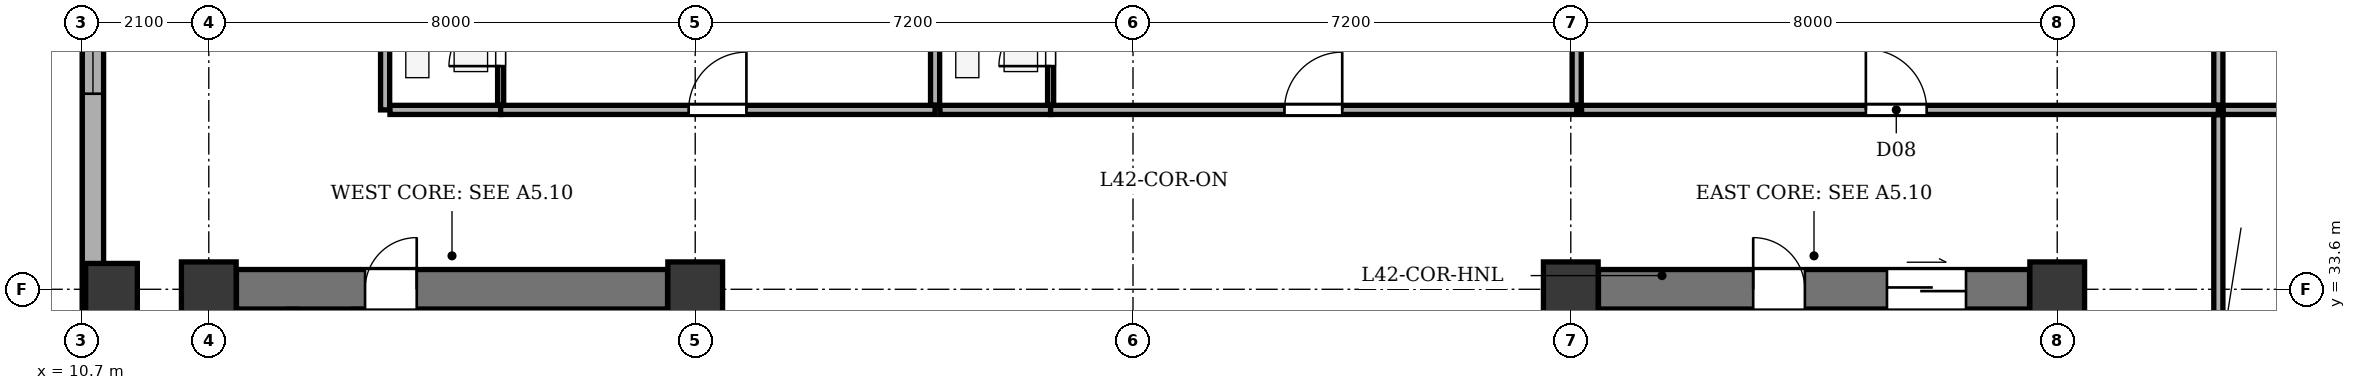
"""IFC4 building model, lengths in metres.
Left out: names, types, materials, properties, quantities, classifications, styles, units other than length and angle.
Written with IfcOpenShell. Run it as: python <this file> out.ifc"""

import sys

from ifc_helpers import new_model, si_unit, direction, frame, frame_2d, origin, origin_2d, place, context, subcontext, project, spatial, rectangle, extrude, element, fill, save


model = new_model("IFC4")
c1 = context("Model", 3, precision=1e-05, world=origin(), true_north=direction((0.0, 1.0)))
c2 = subcontext(c1, "Body", "Model", "MODEL_VIEW")
j1 = project(units=[si_unit("LENGTHUNIT", "METRE"), si_unit("PLANEANGLEUNIT", "RADIAN")], contexts=[c1])
p1 = place(None, origin())
s1 = spatial("IfcSite", under=j1, at=p1, CompositionType="ELEMENT")
p2 = place(p1, origin())
s2 = spatial("IfcBuilding", under=s1, at=p2, CompositionType="ELEMENT")
p3 = place(p2, frame((0.0, 0.0, 165.8)))
s3 = spatial("IfcBuildingStorey", under=s2, at=p3, CompositionType="ELEMENT", Elevation=165.8)
for number, where, z_axis, x_axis in (
    (1, (12.8, 33.6, 0.0), (0.0, 0.0, 1.0), (1.0, 0.0, 0.0)),
    (2, (20.8, 33.6, 0.0), (0.0, 0.0, 1.0), (1.0, 0.0, 0.0)),
    (3, (35.2, 33.6, 0.0), (0.0, 0.0, 1.0), (1.0, 0.0, 0.0)),
    (4, (43.2, 33.6, 0.0), (0.0, 0.0, 1.0), (1.0, 0.0, 0.0)),
):
    element("IfcColumn", number, at=place(p3, frame(where, z_axis=z_axis, x_axis=x_axis)), inside=s3, PredefinedType="COLUMN", context=c2, shape_type="SweptSolid", body=[
        extrude(rectangle(XDim=0.9, YDim=0.9, at=origin_2d()), origin(), (0.0, 0.0, 1.0), 3.5),
    ])
p4 = place(p3, frame((11.2, 33.6, 0.0), z_axis=(0.0, 0.0, 1.0), x_axis=(1.0, 0.0, 0.0)))
e5 = element("IfcColumn", 5, at=p4, inside=s3, PredefinedType="COLUMN", context=c2, shape_type="SweptSolid", body=[
    extrude(rectangle(XDim=0.85, YDim=0.85, at=origin_2d()), origin(), (0.0, 0.0, 1.0), 3.5),
])
p5 = place(p3, frame((10.895, 12.9, 0.0), z_axis=(0.0, 0.0, 1.0), x_axis=(0.0, 1.0, 0.0)))
e6 = element("IfcWall", 6, at=p5, inside=s3, PredefinedType="STANDARD", context=c2, shape_type="SweptSolid", body=[
    extrude(rectangle(XDim=35.0, YDim=0.35, at=frame_2d((17.5, 0.0))), origin(), (0.0, 0.0, 1.0), 2.785),
])
p6 = place(p5, frame((1.652, 0.0, 0.75)))
e7 = element("IfcOpeningElement", 7, at=p6, cuts=e6, PredefinedType="OPENING", context=c2, shape_type="SweptSolid", body=[
    extrude(rectangle(XDim=1.6, YDim=1.75, at=frame_2d((0.8, 0.875))), frame((0.0, 0.185, 0.0), z_axis=(0.0, -1.0, 0.0), x_axis=(1.0, 0.0, 0.0)), (0.0, 0.0, 1.0), 0.37),
])
p7 = place(p5, frame((4.748, 0.0, 0.75)))
e8 = element("IfcOpeningElement", 8, at=p7, cuts=e6, PredefinedType="OPENING", context=c2, shape_type="SweptSolid", body=[
    extrude(rectangle(XDim=1.6, YDim=1.75, at=frame_2d((0.8, 0.875))), frame((0.0, 0.185, 0.0), z_axis=(0.0, -1.0, 0.0), x_axis=(1.0, 0.0, 0.0)), (0.0, 0.0, 1.0), 0.37),
])
p8 = place(p5, frame((10.752, 0.0, 0.75)))
e9 = element("IfcOpeningElement", 9, at=p8, cuts=e6, PredefinedType="OPENING", context=c2, shape_type="SweptSolid", body=[
    extrude(rectangle(XDim=1.6, YDim=1.75, at=frame_2d((0.8, 0.875))), frame((0.0, 0.185, 0.0), z_axis=(0.0, -1.0, 0.0), x_axis=(1.0, 0.0, 0.0)), (0.0, 0.0, 1.0), 0.37),
])
p9 = place(p5, frame((15.998, 0.0, 0.75)))
e10 = element("IfcOpeningElement", 10, at=p9, cuts=e6, PredefinedType="OPENING", context=c2, shape_type="SweptSolid", body=[
    extrude(rectangle(XDim=2.1, YDim=1.75, at=frame_2d((1.05, 0.875))), frame((0.0, 0.185, 0.0), z_axis=(0.0, -1.0, 0.0), x_axis=(1.0, 0.0, 0.0)), (0.0, 0.0, 1.0), 0.37),
])
p10 = place(p5, frame((23.916, 0.0, 0.75)))
e11 = element("IfcOpeningElement", 11, at=p10, cuts=e6, PredefinedType="OPENING", context=c2, shape_type="SweptSolid", body=[
    extrude(rectangle(XDim=1.6, YDim=1.75, at=frame_2d((0.8, 0.875))), frame((0.0, 0.185, 0.0), z_axis=(0.0, -1.0, 0.0), x_axis=(1.0, 0.0, 0.0)), (0.0, 0.0, 1.0), 0.37),
])
p11 = place(p5, frame((29.834, 0.0, 0.75)))
e12 = element("IfcOpeningElement", 12, at=p11, cuts=e6, PredefinedType="OPENING", context=c2, shape_type="SweptSolid", body=[
    extrude(rectangle(XDim=2.1, YDim=1.75, at=frame_2d((1.05, 0.875))), frame((0.0, 0.185, 0.0), z_axis=(0.0, -1.0, 0.0), x_axis=(1.0, 0.0, 0.0)), (0.0, 0.0, 1.0), 0.37),
])
p12 = place(p3, frame((13.255, 33.6, 0.0), z_axis=(0.0, 0.0, 1.0), x_axis=(1.0, 0.0, 0.0)))
e13 = element("IfcWall", 13, at=p12, inside=s3, PredefinedType="SHEAR", context=c2, shape_type="SweptSolid", body=[
    extrude(rectangle(XDim=7.09, YDim=0.65, at=frame_2d((3.545, 0.0))), origin(), (0.0, 0.0, 1.0), 3.2),
])
p13 = place(p12, frame((2.115, 0.0, 0.0)))
e14 = element("IfcOpeningElement", 14, at=p13, cuts=e13, PredefinedType="OPENING", context=c2, shape_type="SweptSolid", body=[
    extrude(rectangle(XDim=0.85, YDim=2.02, at=frame_2d((0.425, 1.01))), frame((0.0, 0.335, 0.0), z_axis=(0.0, -1.0, 0.0), x_axis=(1.0, 0.0, 0.0)), (0.0, 0.0, 1.0), 0.67),
])
p14 = place(p3, frame((16.435, 21.135, 0.0), z_axis=(0.0, 0.0, 1.0), x_axis=(0.0, 1.0, 0.0)))
e15 = element("IfcWall", 15, at=p14, inside=s3, PredefinedType="SHEAR", context=c2, shape_type="SweptSolid", body=[
    extrude(rectangle(XDim=12.13, YDim=0.25, at=frame_2d((6.065, 0.0))), origin(), (0.0, 0.0, 1.0), 3.2),
])
p15 = place(p14, frame((0.515, 0.0, 0.0)))
e16 = element("IfcOpeningElement", 16, at=p15, cuts=e15, PredefinedType="OPENING", context=c2, shape_type="SweptSolid", body=[
    extrude(rectangle(XDim=1.2, YDim=2.15, at=frame_2d((0.6, 1.075))), frame((0.0, 0.135, 0.0), z_axis=(0.0, -1.0, 0.0), x_axis=(1.0, 0.0, 0.0)), (0.0, 0.0, 1.0), 0.27),
])
p16 = place(p14, frame((2.665, 0.0, 0.0)))
e17 = element("IfcOpeningElement", 17, at=p16, cuts=e15, PredefinedType="OPENING", context=c2, shape_type="SweptSolid", body=[
    extrude(rectangle(XDim=1.15, YDim=2.15, at=frame_2d((0.575, 1.075))), frame((0.0, 0.135, 0.0), z_axis=(0.0, -1.0, 0.0), x_axis=(1.0, 0.0, 0.0)), (0.0, 0.0, 1.0), 0.27),
])
p17 = place(p3, frame((18.12, 31.17, 0.0), z_axis=(0.0, 0.0, 1.0), x_axis=(0.0, 1.0, 0.0)))
e18 = element("IfcWall", 18, at=p17, inside=s3, PredefinedType="PARTITIONING", context=c2, shape_type="SweptSolid", body=[
    extrude(rectangle(XDim=2.095, YDim=0.18, at=frame_2d((1.047, 0.0))), origin(), (0.0, 0.0, 1.0), 3.2),
])
p18 = place(p3, frame((35.655, 33.6, 0.0), z_axis=(0.0, 0.0, 1.0), x_axis=(1.0, 0.0, 0.0)))
e19 = element("IfcWall", 19, at=p18, inside=s3, PredefinedType="SHEAR", context=c2, shape_type="SweptSolid", body=[
    extrude(rectangle(XDim=7.09, YDim=0.65, at=frame_2d((3.545, 0.0))), origin(), (0.0, 0.0, 1.0), 3.2),
])
p19 = place(p18, frame((4.745, 0.0, 0.0)))
e20 = element("IfcOpeningElement", 20, at=p19, cuts=e19, PredefinedType="OPENING", context=c2, shape_type="SweptSolid", body=[
    extrude(rectangle(XDim=1.3, YDim=2.15, at=frame_2d((0.65, 1.075))), frame((0.0, 0.335, 0.0), z_axis=(0.0, -1.0, 0.0), x_axis=(1.0, 0.0, 0.0)), (0.0, 0.0, 1.0), 0.67),
])
p20 = place(p18, frame((2.545, 0.0, 0.0)))
e21 = element("IfcOpeningElement", 21, at=p20, cuts=e19, PredefinedType="OPENING", context=c2, shape_type="SweptSolid", body=[
    extrude(rectangle(XDim=0.85, YDim=2.02, at=frame_2d((0.425, 1.01))), frame((0.0, 0.335, 0.0), z_axis=(0.0, -1.0, 0.0), x_axis=(1.0, 0.0, 0.0)), (0.0, 0.0, 1.0), 0.67),
])
p21 = place(p3, frame((39.565, 21.135, 0.0), z_axis=(0.0, 0.0, 1.0), x_axis=(0.0, 1.0, 0.0)))
e22 = element("IfcWall", 22, at=p21, inside=s3, PredefinedType="SHEAR", context=c2, shape_type="SweptSolid", body=[
    extrude(rectangle(XDim=12.13, YDim=0.25, at=frame_2d((6.065, 0.0))), origin(), (0.0, 0.0, 1.0), 3.2),
])
p22 = place(p21, frame((0.515, 0.0, 0.0)))
e23 = element("IfcOpeningElement", 23, at=p22, cuts=e22, PredefinedType="OPENING", context=c2, shape_type="SweptSolid", body=[
    extrude(rectangle(XDim=1.2, YDim=2.15, at=frame_2d((0.6, 1.075))), frame((0.0, 0.135, 0.0), z_axis=(0.0, -1.0, 0.0), x_axis=(1.0, 0.0, 0.0)), (0.0, 0.0, 1.0), 0.27),
])
p23 = place(p21, frame((2.665, 0.0, 0.0)))
e24 = element("IfcOpeningElement", 24, at=p23, cuts=e22, PredefinedType="OPENING", context=c2, shape_type="SweptSolid", body=[
    extrude(rectangle(XDim=1.15, YDim=2.15, at=frame_2d((0.575, 1.075))), frame((0.0, 0.135, 0.0), z_axis=(0.0, -1.0, 0.0), x_axis=(1.0, 0.0, 0.0)), (0.0, 0.0, 1.0), 0.27),
])
p24 = place(p3, frame((37.9, 25.27, 0.0), z_axis=(0.0, 0.0, 1.0), x_axis=(0.0, 1.0, 0.0)))
e25 = element("IfcWall", 25, at=p24, inside=s3, PredefinedType="SOLIDWALL", context=c2, shape_type="SweptSolid", body=[
    extrude(rectangle(XDim=7.995, YDim=0.2, at=frame_2d((3.998, 0.0))), origin(), (0.0, 0.0, 1.0), 3.2),
])
p25 = place(p3, frame((14.18, 30.96, 0.0), z_axis=(0.0, 0.0, 1.0), x_axis=(0.0, 1.0, 0.0)))
e26 = element("IfcWall", 26, at=p25, inside=s3, PredefinedType="PARTITIONING", context=c2, shape_type="SweptSolid", body=[
    extrude(rectangle(XDim=2.31, YDim=0.15, at=frame_2d((1.155, 0.0))), origin(), (0.0, 0.0, 1.0), 3.2),
])
p26 = place(p25, frame((0.47, 0.0, 0.0)))
e27 = element("IfcOpeningElement", 27, at=p26, cuts=e26, PredefinedType="OPENING", context=c2, shape_type="SweptSolid", body=[
    extrude(rectangle(XDim=0.85, YDim=2.02, at=frame_2d((0.425, 1.01))), frame((0.0, 0.085, 0.0), z_axis=(0.0, -1.0, 0.0), x_axis=(1.0, 0.0, 0.0)), (0.0, 0.0, 1.0), 0.17),
])
p27 = place(p3, frame((15.25, 30.96, 0.0), z_axis=(0.0, 0.0, 1.0), x_axis=(0.0, 1.0, 0.0)))
e28 = element("IfcWall", 28, at=p27, inside=s3, PredefinedType="PARTITIONING", context=c2, shape_type="SweptSolid", body=[
    extrude(rectangle(XDim=2.31, YDim=0.15, at=frame_2d((1.155, 0.0))), origin(), (0.0, 0.0, 1.0), 3.2),
])
p28 = place(p27, frame((0.47, 0.0, 0.0)))
e29 = element("IfcOpeningElement", 29, at=p28, cuts=e28, PredefinedType="OPENING", context=c2, shape_type="SweptSolid", body=[
    extrude(rectangle(XDim=0.85, YDim=2.02, at=frame_2d((0.425, 1.01))), frame((0.0, 0.085, 0.0), z_axis=(0.0, -1.0, 0.0), x_axis=(1.0, 0.0, 0.0)), (0.0, 0.0, 1.0), 0.17),
])
p29 = place(p3, frame((15.7, 36.55, 0.0), z_axis=(0.0, 0.0, 1.0), x_axis=(0.0, 1.0, 0.0)))
e30 = element("IfcWall", 30, at=p29, inside=s3, PredefinedType="PARTITIONING", context=c2, shape_type="SweptSolid", body=[
    extrude(rectangle(XDim=15.975, YDim=0.15, at=frame_2d((7.987, 0.0))), origin(), (0.0, 0.0, 1.0), 3.2),
])
p30 = place(p3, frame((15.78, 36.55, 0.0), z_axis=(0.0, 0.0, 1.0), x_axis=(1.0, 0.0, 0.0)))
e31 = element("IfcWall", 31, at=p30, inside=s3, PredefinedType="PARTITIONING", context=c2, shape_type="SweptSolid", body=[
    extrude(rectangle(XDim=1.82, YDim=0.15, at=frame_2d((0.91, 0.0))), origin(), (0.0, 0.0, 1.0), 3.2),
])
p31 = place(p3, frame((17.6, 36.55, 0.0), z_axis=(0.0, 0.0, 1.0), x_axis=(1.0, 0.0, 0.0)))
e32 = element("IfcWall", 32, at=p31, inside=s3, PredefinedType="PARTITIONING", context=c2, shape_type="SweptSolid", body=[
    extrude(rectangle(XDim=7.145, YDim=0.15, at=frame_2d((3.573, 0.0))), origin(), (0.0, 0.0, 1.0), 3.2),
])
p32 = place(p31, frame((3.092, 0.0, 0.0)))
e33 = element("IfcOpeningElement", 33, at=p32, cuts=e32, PredefinedType="OPENING", context=c2, shape_type="SweptSolid", body=[
    extrude(rectangle(XDim=0.95, YDim=2.1, at=frame_2d((0.475, 1.05))), frame((0.0, 0.085, 0.0), z_axis=(0.0, -1.0, 0.0), x_axis=(1.0, 0.0, 0.0)), (0.0, 0.0, 1.0), 0.17),
])
p33 = place(p3, frame((17.6, 36.63, 0.0), z_axis=(0.0, 0.0, 1.0), x_axis=(0.0, 1.0, 0.0)))
e34 = element("IfcWall", 34, at=p33, inside=s3, PredefinedType="PARTITIONING", context=c2, shape_type="SweptSolid", body=[
    extrude(rectangle(XDim=2.25, YDim=0.1, at=frame_2d((1.125, 0.0))), origin(), (0.0, 0.0, 1.0), 3.2),
])
p34 = place(p33, frame((0.64, 0.0, 0.0)))
e35 = element("IfcOpeningElement", 35, at=p34, cuts=e34, PredefinedType="OPENING", context=c2, shape_type="SweptSolid", body=[
    extrude(rectangle(XDim=0.85, YDim=2.05, at=frame_2d((0.425, 1.025))), frame((0.0, 0.06, 0.0), z_axis=(0.0, -1.0, 0.0), x_axis=(1.0, 0.0, 0.0)), (0.0, 0.0, 1.0), 0.12),
])
p35 = place(p3, frame((24.745, 36.63, 0.0), z_axis=(0.0, 0.0, 1.0), x_axis=(0.0, 1.0, 0.0)))
e36 = element("IfcWall", 36, at=p35, inside=s3, PredefinedType="PARTITIONING", context=c2, shape_type="SweptSolid", body=[
    extrude(rectangle(XDim=15.895, YDim=0.15, at=frame_2d((7.948, 0.0))), origin(), (0.0, 0.0, 1.0), 3.2),
])
p36 = place(p3, frame((24.825, 36.55, 0.0), z_axis=(0.0, 0.0, 1.0), x_axis=(1.0, 0.0, 0.0)))
e37 = element("IfcWall", 37, at=p36, inside=s3, PredefinedType="PARTITIONING", context=c2, shape_type="SweptSolid", body=[
    extrude(rectangle(XDim=1.82, YDim=0.15, at=frame_2d((0.91, 0.0))), origin(), (0.0, 0.0, 1.0), 3.2),
])
p37 = place(p3, frame((26.645, 36.55, 0.0), z_axis=(0.0, 0.0, 1.0), x_axis=(1.0, 0.0, 0.0)))
e38 = element("IfcWall", 38, at=p37, inside=s3, PredefinedType="PARTITIONING", context=c2, shape_type="SweptSolid", body=[
    extrude(rectangle(XDim=8.652, YDim=0.15, at=frame_2d((4.326, 0.0))), origin(), (0.0, 0.0, 1.0), 3.2),
])
p38 = place(p37, frame((3.846, 0.0, 0.0)))
e39 = element("IfcOpeningElement", 39, at=p38, cuts=e38, PredefinedType="OPENING", context=c2, shape_type="SweptSolid", body=[
    extrude(rectangle(XDim=0.95, YDim=2.1, at=frame_2d((0.475, 1.05))), frame((0.0, 0.085, 0.0), z_axis=(0.0, -1.0, 0.0), x_axis=(1.0, 0.0, 0.0)), (0.0, 0.0, 1.0), 0.17),
])
p39 = place(p3, frame((26.645, 36.63, 0.0), z_axis=(0.0, 0.0, 1.0), x_axis=(0.0, 1.0, 0.0)))
e40 = element("IfcWall", 40, at=p39, inside=s3, PredefinedType="PARTITIONING", context=c2, shape_type="SweptSolid", body=[
    extrude(rectangle(XDim=2.25, YDim=0.1, at=frame_2d((1.125, 0.0))), origin(), (0.0, 0.0, 1.0), 3.2),
])
p40 = place(p39, frame((0.64, 0.0, 0.0)))
e41 = element("IfcOpeningElement", 41, at=p40, cuts=e40, PredefinedType="OPENING", context=c2, shape_type="SweptSolid", body=[
    extrude(rectangle(XDim=0.85, YDim=2.05, at=frame_2d((0.425, 1.025))), frame((0.0, 0.06, 0.0), z_axis=(0.0, -1.0, 0.0), x_axis=(1.0, 0.0, 0.0)), (0.0, 0.0, 1.0), 0.12),
])
p41 = place(p3, frame((35.297, 36.63, 0.0), z_axis=(0.0, 0.0, 1.0), x_axis=(0.0, 1.0, 0.0)))
e42 = element("IfcWall", 42, at=p41, inside=s3, PredefinedType="PARTITIONING", context=c2, shape_type="SweptSolid", body=[
    extrude(rectangle(XDim=15.895, YDim=0.15, at=frame_2d((7.948, 0.0))), origin(), (0.0, 0.0, 1.0), 2.535),
])
p42 = place(p3, frame((35.377, 36.55, 0.0), z_axis=(0.0, 0.0, 1.0), x_axis=(1.0, 0.0, 0.0)))
e43 = element("IfcWall", 43, at=p42, inside=s3, PredefinedType="PARTITIONING", context=c2, shape_type="SweptSolid", body=[
    extrude(rectangle(XDim=10.473, YDim=0.15, at=frame_2d((5.237, 0.0))), origin(), (0.0, 0.0, 1.0), 3.2),
])
p43 = place(p42, frame((4.676, 0.0, 0.0)))
e44 = element("IfcOpeningElement", 44, at=p43, cuts=e43, PredefinedType="OPENING", context=c2, shape_type="SweptSolid", body=[
    extrude(rectangle(XDim=1.0, YDim=2.1, at=frame_2d((0.5, 1.05))), frame((0.0, 0.085, 0.0), z_axis=(0.0, -1.0, 0.0), x_axis=(1.0, 0.0, 0.0)), (0.0, 0.0, 1.0), 0.17),
])
p44 = place(p3, frame((45.85, 36.63, 0.0), z_axis=(0.0, 0.0, 1.0), x_axis=(0.0, 1.0, 0.0)))
e45 = element("IfcWall", 45, at=p44, inside=s3, PredefinedType="PARTITIONING", context=c2, shape_type="SweptSolid", body=[
    extrude(rectangle(XDim=15.895, YDim=0.15, at=frame_2d((7.948, 0.0))), origin(), (0.0, 0.0, 1.0), 3.2),
])
p45 = place(p3, frame((45.93, 36.55, 0.0), z_axis=(0.0, 0.0, 1.0), x_axis=(1.0, 0.0, 0.0)))
e46 = element("IfcWall", 46, at=p45, inside=s3, PredefinedType="PARTITIONING", context=c2, shape_type="SweptSolid", body=[
    extrude(rectangle(XDim=9.395, YDim=0.15, at=frame_2d((4.698, 0.0))), origin(), (0.0, 0.0, 1.0), 3.2),
])
p46 = place(p3, frame((45.85, 17.93, 0.0), z_axis=(0.0, 0.0, 1.0), x_axis=(0.0, 1.0, 0.0)))
e47 = element("IfcWall", 47, at=p46, inside=s3, PredefinedType="PARTITIONING", context=c2, shape_type="SweptSolid", body=[
    extrude(rectangle(XDim=18.54, YDim=0.15, at=frame_2d((9.27, 0.0))), origin(), (0.0, 0.0, 1.0), 3.2),
])
p47 = place(p46, frame((8.79, 0.0, 0.0)))
e48 = element("IfcOpeningElement", 48, at=p47, cuts=e47, PredefinedType="OPENING", context=c2, shape_type="SweptSolid", body=[
    extrude(rectangle(XDim=0.95, YDim=2.1, at=frame_2d((0.475, 1.05))), frame((0.0, 0.085, 0.0), z_axis=(0.0, -1.0, 0.0), x_axis=(1.0, 0.0, 0.0)), (0.0, 0.0, 1.0), 0.17),
])
p48 = place(p10, origin())
e49 = element("IfcWindow", 49, at=p48, inside=s3, PartitioningType="SINGLE_PANEL", PredefinedType="WINDOW", context=c2, shape_type="SweptSolid", body=[
    extrude(rectangle(XDim=1.6, YDim=1.75, at=frame_2d((0.8, 0.875))), frame((0.0, -0.01, 0.0), z_axis=(0.0, -1.0, 0.0), x_axis=(1.0, 0.0, 0.0)), (0.0, 0.0, 1.0), 0.06),
])
fill(e11, e49)
p49 = place(p13, origin())
e50 = element("IfcDoor", 50, at=p49, inside=s3, OperationType="SINGLE_SWING_RIGHT", PredefinedType="DOOR", context=c2, shape_type="SweptSolid", body=[
    extrude(rectangle(XDim=0.85, YDim=2.02, at=frame_2d((0.425, 1.01))), frame((0.0, 0.025, 0.0), z_axis=(0.0, -1.0, 0.0), x_axis=(1.0, 0.0, 0.0)), (0.0, 0.0, 1.0), 0.05),
])
fill(e14, e50)
p50 = place(p19, origin())
e51 = element("IfcDoor", 51, at=p50, inside=s3, OperationType="DOUBLE_DOOR_SLIDING", PredefinedType="DOOR", context=c2, shape_type="SweptSolid", body=[
    extrude(rectangle(XDim=1.3, YDim=2.15, at=frame_2d((0.65, 1.075))), frame((0.0, 0.025, 0.0), z_axis=(0.0, -1.0, 0.0), x_axis=(1.0, 0.0, 0.0)), (0.0, 0.0, 1.0), 0.05),
])
fill(e20, e51)
p51 = place(p20, origin())
e52 = element("IfcDoor", 52, at=p51, inside=s3, OperationType="SINGLE_SWING_LEFT", PredefinedType="DOOR", context=c2, shape_type="SweptSolid", body=[
    extrude(rectangle(XDim=0.85, YDim=2.02, at=frame_2d((0.425, 1.01))), frame((0.0, 0.025, 0.0), z_axis=(0.0, -1.0, 0.0), x_axis=(1.0, 0.0, 0.0)), (0.0, 0.0, 1.0), 0.05),
])
fill(e21, e52)
p52 = place(p34, origin())
e53 = element("IfcDoor", 53, at=p52, inside=s3, OperationType="SINGLE_SWING_LEFT", PredefinedType="DOOR", context=c2, shape_type="SweptSolid", body=[
    extrude(rectangle(XDim=0.85, YDim=2.05, at=frame_2d((0.425, 1.025))), frame((0.0, 0.025, 0.0), z_axis=(0.0, -1.0, 0.0), x_axis=(1.0, 0.0, 0.0)), (0.0, 0.0, 1.0), 0.05),
])
fill(e35, e53)
p53 = place(p32, origin())
e54 = element("IfcDoor", 54, at=p53, inside=s3, OperationType="SINGLE_SWING_RIGHT", PredefinedType="DOOR", context=c2, shape_type="SweptSolid", body=[
    extrude(rectangle(XDim=0.95, YDim=2.1, at=frame_2d((0.475, 1.05))), frame((0.0, 0.025, 0.0), z_axis=(0.0, -1.0, 0.0), x_axis=(1.0, 0.0, 0.0)), (0.0, 0.0, 1.0), 0.05),
])
fill(e33, e54)
p54 = place(p40, origin())
e55 = element("IfcDoor", 55, at=p54, inside=s3, OperationType="SINGLE_SWING_LEFT", PredefinedType="DOOR", context=c2, shape_type="SweptSolid", body=[
    extrude(rectangle(XDim=0.85, YDim=2.05, at=frame_2d((0.425, 1.025))), frame((0.0, 0.025, 0.0), z_axis=(0.0, -1.0, 0.0), x_axis=(1.0, 0.0, 0.0)), (0.0, 0.0, 1.0), 0.05),
])
fill(e41, e55)
p55 = place(p38, origin())
e56 = element("IfcDoor", 56, at=p55, inside=s3, OperationType="SINGLE_SWING_RIGHT", PredefinedType="DOOR", context=c2, shape_type="SweptSolid", body=[
    extrude(rectangle(XDim=0.95, YDim=2.1, at=frame_2d((0.475, 1.05))), frame((0.0, 0.025, 0.0), z_axis=(0.0, -1.0, 0.0), x_axis=(1.0, 0.0, 0.0)), (0.0, 0.0, 1.0), 0.05),
])
fill(e39, e56)
p56 = place(p43, origin())
e57 = element("IfcDoor", 57, at=p56, inside=s3, OperationType="SINGLE_SWING_LEFT", PredefinedType="DOOR", context=c2, shape_type="SweptSolid", body=[
    extrude(rectangle(XDim=1.0, YDim=2.1, at=frame_2d((0.5, 1.05))), frame((0.0, 0.025, 0.0), z_axis=(0.0, -1.0, 0.0), x_axis=(1.0, 0.0, 0.0)), (0.0, 0.0, 1.0), 0.05),
])
fill(e44, e57)
save(model, sys.argv[1])
